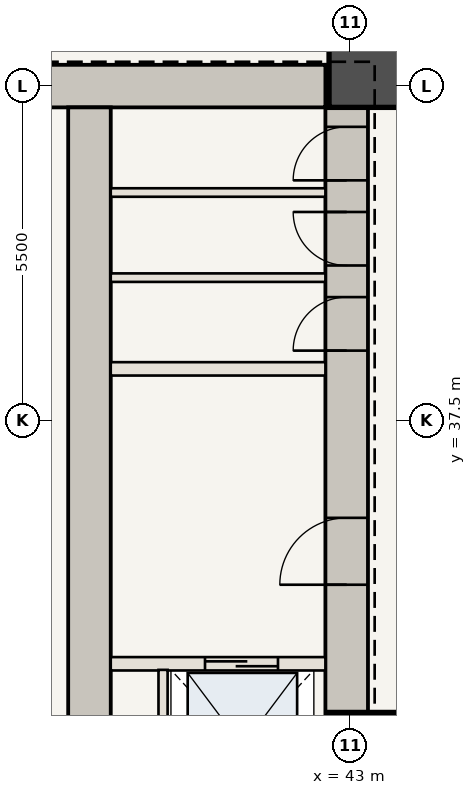
"""IFC4 building model, lengths in metres.
Left out: names, types, materials, properties, quantities, classifications, styles, units other than length and angle.
Written with IfcOpenShell. Run it as: python <this file> out.ifc"""

import sys

from ifc_helpers import new_model, si_unit, direction, frame, frame_2d, origin, origin_2d, place, context, subcontext, project, spatial, rectangle, extrude, element, fill, save


model = new_model("IFC4")
c1 = context("Model", 3, precision=1e-05, world=origin(), true_north=direction((0.0, 1.0)))
c2 = subcontext(c1, "Body", "Model", "MODEL_VIEW")
j1 = project(units=[si_unit("LENGTHUNIT", "METRE"), si_unit("PLANEANGLEUNIT", "RADIAN")], contexts=[c1])
p1 = place(None, origin())
s1 = spatial("IfcSite", under=j1, at=p1, CompositionType="ELEMENT")
p2 = place(p1, origin())
s2 = spatial("IfcBuilding", under=s1, at=p2, CompositionType="ELEMENT")
p3 = place(p2, frame((0.0, 0.0, 23.8)))
s3 = spatial("IfcBuildingStorey", under=s2, at=p3, CompositionType="ELEMENT", Elevation=23.8)
p4 = place(p3, frame((42.94, 30.6, 0.0), z_axis=(0.0, 0.0, 1.0), x_axis=(0.0, 1.0, 0.0)))
e1 = element("IfcWall", 1, at=p4, inside=s3, PredefinedType="SHEAR", context=c2, shape_type="SweptSolid", body=[
    extrude(rectangle(XDim=12.75, YDim=0.7, at=frame_2d((6.375, 0.0))), origin(), (0.0, 0.0, 1.0), 5.6),
])
p5 = place(p4, frame((4.2, 0.0, 0.0)))
e2 = element("IfcOpeningElement", 2, at=p5, cuts=e1, PredefinedType="OPENING", context=c2, shape_type="SweptSolid", body=[
    extrude(rectangle(XDim=1.1, YDim=2.15, at=frame_2d((0.55, 1.075))), frame((0.0, 0.36, 0.0), z_axis=(0.0, -1.0, 0.0), x_axis=(1.0, 0.0, 0.0)), (0.0, 0.0, 1.0), 0.72),
])
p6 = place(p4, frame((8.05, 0.0, 0.0)))
e3 = element("IfcOpeningElement", 3, at=p6, cuts=e1, PredefinedType="OPENING", context=c2, shape_type="SweptSolid", body=[
    extrude(rectangle(XDim=0.88, YDim=2.1, at=frame_2d((0.44, 1.05))), frame((0.0, 0.36, 0.0), z_axis=(0.0, -1.0, 0.0), x_axis=(1.0, 0.0, 0.0)), (0.0, 0.0, 1.0), 0.72),
])
p7 = place(p4, frame((9.45, 0.0, 0.0)))
e4 = element("IfcOpeningElement", 4, at=p7, cuts=e1, PredefinedType="OPENING", context=c2, shape_type="SweptSolid", body=[
    extrude(rectangle(XDim=0.88, YDim=2.1, at=frame_2d((0.44, 1.05))), frame((0.0, 0.36, 0.0), z_axis=(0.0, -1.0, 0.0), x_axis=(1.0, 0.0, 0.0)), (0.0, 0.0, 1.0), 0.72),
])
p8 = place(p4, frame((10.85, 0.0, 0.0)))
e5 = element("IfcOpeningElement", 5, at=p8, cuts=e1, PredefinedType="OPENING", context=c2, shape_type="SweptSolid", body=[
    extrude(rectangle(XDim=0.88, YDim=2.1, at=frame_2d((0.44, 1.05))), frame((0.0, 0.36, 0.0), z_axis=(0.0, -1.0, 0.0), x_axis=(1.0, 0.0, 0.0)), (0.0, 0.0, 1.0), 0.72),
])
p9 = place(p3, frame((37.75, 43.0, 0.0), z_axis=(0.0, 0.0, 1.0), x_axis=(1.0, 0.0, 0.0)))
e6 = element("IfcWall", 6, at=p9, inside=s3, PredefinedType="SHEAR", context=c2, shape_type="SweptSolid", body=[
    extrude(rectangle(XDim=4.84, YDim=0.7, at=frame_2d((2.42, 0.0))), origin(), (0.0, 0.0, 1.0), 5.6),
])
p10 = place(p3, frame((38.71, 30.6, 0.0), z_axis=(0.0, 0.0, 1.0), x_axis=(0.0, 1.0, 0.0)))
e7 = element("IfcWall", 7, at=p10, inside=s3, PredefinedType="SHEAR", context=c2, shape_type="SweptSolid", body=[
    extrude(rectangle(XDim=12.05, YDim=0.7, at=frame_2d((6.025, 0.0))), origin(), (0.0, 0.0, 1.0), 5.6),
])
for number, where, z_axis, x_axis in (
    (8, (43.35, 32.0, 0.0), (0.0, 0.0, 1.0), (1.0, 0.0, 0.0)),
    (9, (43.35, 43.35, 0.0), (0.0, 0.0, 1.0), (1.0, 0.0, 0.0)),
):
    element("IfcColumn", number, at=place(p3, frame(where, z_axis=z_axis, x_axis=x_axis)), inside=s3, PredefinedType="COLUMN", context=c2, shape_type="SweptSolid", body=[
        extrude(rectangle(XDim=1.4, YDim=1.4, at=origin_2d()), origin(), (0.0, 0.0, 1.0), 5.6),
    ])
p11 = place(p3, frame((39.06, 33.5, 0.0), z_axis=(0.0, 0.0, 1.0), x_axis=(1.0, 0.0, 0.0)))
e10 = element("IfcWall", 10, at=p11, inside=s3, PredefinedType="STANDARD", context=c2, shape_type="SweptSolid", body=[
    extrude(rectangle(XDim=3.53, YDim=0.22, at=frame_2d((1.765, 0.0))), origin(), (0.0, 0.0, 1.0), 5.18),
])
p12 = place(p11, frame((1.55, 0.0, 0.0)))
e11 = element("IfcOpeningElement", 11, at=p12, cuts=e10, PredefinedType="OPENING", context=c2, shape_type="SweptSolid", body=[
    extrude(rectangle(XDim=1.2, YDim=2.2, at=frame_2d((0.6, 1.1))), frame((0.0, 0.12, 0.0), z_axis=(0.0, -1.0, 0.0), x_axis=(1.0, 0.0, 0.0)), (0.0, 0.0, 1.0), 0.24),
])
p13 = place(p3, frame((39.92, 30.75, 0.0), z_axis=(0.0, 0.0, 1.0), x_axis=(0.0, 1.0, 0.0)))
e12 = element("IfcWall", 12, at=p13, inside=s3, PredefinedType="STANDARD", context=c2, shape_type="SweptSolid", body=[
    extrude(rectangle(XDim=2.65, YDim=0.15, at=frame_2d((1.325, 0.0))), origin(), (0.0, 0.0, 1.0), 5.18),
])
p14 = place(p3, frame((39.06, 38.35, 0.0), z_axis=(0.0, 0.0, 1.0), x_axis=(1.0, 0.0, 0.0)))
e13 = element("IfcWall", 13, at=p14, inside=s3, PredefinedType="STANDARD", context=c2, shape_type="SweptSolid", body=[
    extrude(rectangle(XDim=3.53, YDim=0.22, at=frame_2d((1.765, 0.0))), origin(), (0.0, 0.0, 1.0), 5.18),
])
for number, where, z_axis, x_axis in (
    (14, (39.06, 39.85, 0.0), (0.0, 0.0, 1.0), (1.0, 0.0, 0.0)),
    (15, (39.06, 41.25, 0.0), (0.0, 0.0, 1.0), (1.0, 0.0, 0.0)),
):
    element("IfcWall", number, at=place(p3, frame(where, z_axis=z_axis, x_axis=x_axis)), inside=s3, PredefinedType="STANDARD", context=c2, shape_type="SweptSolid", body=[
        extrude(rectangle(XDim=3.53, YDim=0.14, at=frame_2d((1.765, 0.0))), origin(), (0.0, 0.0, 1.0), 5.18),
    ])
p15 = place(p5, origin())
e16 = element("IfcDoor", 16, at=p15, inside=s3, OperationType="SINGLE_SWING_LEFT", PredefinedType="DOOR", context=c2, shape_type="SweptSolid", body=[
    extrude(rectangle(XDim=1.1, YDim=2.15, at=frame_2d((0.55, 1.075))), frame((0.0, 0.025, 0.0), z_axis=(0.0, -1.0, 0.0), x_axis=(1.0, 0.0, 0.0)), (0.0, 0.0, 1.0), 0.05),
])
fill(e2, e16)
p16 = place(p6, origin())
e17 = element("IfcDoor", 17, at=p16, inside=s3, OperationType="SINGLE_SWING_LEFT", PredefinedType="DOOR", context=c2, shape_type="SweptSolid", body=[
    extrude(rectangle(XDim=0.88, YDim=2.1, at=frame_2d((0.44, 1.05))), frame((0.0, 0.025, 0.0), z_axis=(0.0, -1.0, 0.0), x_axis=(1.0, 0.0, 0.0)), (0.0, 0.0, 1.0), 0.05),
])
fill(e3, e17)
p17 = place(p7, origin())
e18 = element("IfcDoor", 18, at=p17, inside=s3, OperationType="SINGLE_SWING_RIGHT", PredefinedType="DOOR", context=c2, shape_type="SweptSolid", body=[
    extrude(rectangle(XDim=0.88, YDim=2.1, at=frame_2d((0.44, 1.05))), frame((0.0, 0.025, 0.0), z_axis=(0.0, -1.0, 0.0), x_axis=(1.0, 0.0, 0.0)), (0.0, 0.0, 1.0), 0.05),
])
fill(e4, e18)
p18 = place(p8, origin())
e19 = element("IfcDoor", 19, at=p18, inside=s3, OperationType="SINGLE_SWING_LEFT", PredefinedType="DOOR", context=c2, shape_type="SweptSolid", body=[
    extrude(rectangle(XDim=0.88, YDim=2.1, at=frame_2d((0.44, 1.05))), frame((0.0, 0.025, 0.0), z_axis=(0.0, -1.0, 0.0), x_axis=(1.0, 0.0, 0.0)), (0.0, 0.0, 1.0), 0.05),
])
fill(e5, e19)
p19 = place(p12, origin())
e20 = element("IfcDoor", 20, at=p19, inside=s3, OperationType="DOUBLE_DOOR_SLIDING", PredefinedType="DOOR", context=c2, shape_type="SweptSolid", body=[
    extrude(rectangle(XDim=1.2, YDim=2.2, at=frame_2d((0.6, 1.1))), frame((0.0, 0.025, 0.0), z_axis=(0.0, -1.0, 0.0), x_axis=(1.0, 0.0, 0.0)), (0.0, 0.0, 1.0), 0.05),
])
fill(e11, e20)
save(model, sys.argv[1])
